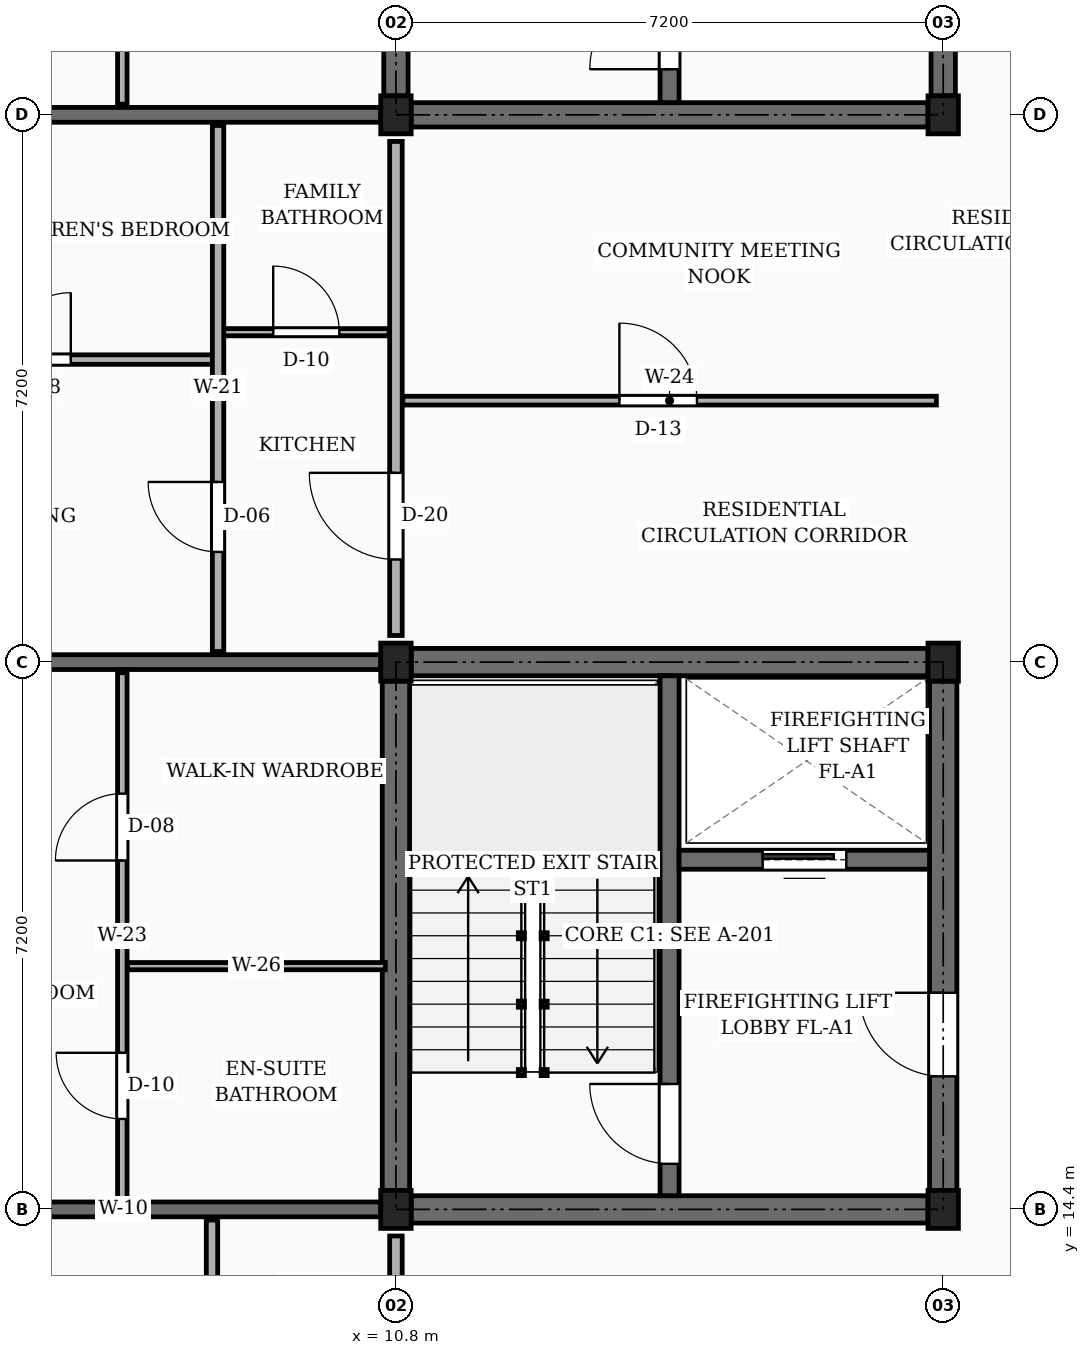
"""IFC4 building model, lengths in metres.
Left out: names, types, materials, properties, quantities, classifications, styles, units other than length and angle.
Written with IfcOpenShell. Run it as: python <this file> out.ifc"""

import sys

from ifc_helpers import new_model, si_unit, direction, frame, frame_2d, origin, origin_2d, place, context, subcontext, project, spatial, rectangle, extrude, element, fill, save


model = new_model("IFC4")
c1 = context("Model", 3, precision=1e-05, world=origin(), true_north=direction((0.0, 1.0)))
c2 = subcontext(c1, "Body", "Model", "MODEL_VIEW")
j1 = project(units=[si_unit("LENGTHUNIT", "METRE"), si_unit("PLANEANGLEUNIT", "RADIAN")], contexts=[c1])
p1 = place(None, origin())
s1 = spatial("IfcSite", under=j1, at=p1, CompositionType="ELEMENT")
p2 = place(p1, origin())
s2 = spatial("IfcBuilding", under=s1, at=p2, CompositionType="ELEMENT")
p3 = place(p2, frame((0.0, 0.0, 42.3)))
s3 = spatial("IfcBuildingStorey", under=s2, at=p3, CompositionType="ELEMENT", Elevation=42.3)
for number, where, z_axis, x_axis in (
    (1, (10.8, 14.4, 0.0), (0.0, 0.0, 1.0), (1.0, 0.0, 0.0)),
    (2, (10.8, 21.6, 0.0), (0.0, 0.0, 1.0), (1.0, 0.0, 0.0)),
    (3, (10.8, 28.8, 0.0), (0.0, 0.0, 1.0), (1.0, 0.0, 0.0)),
    (4, (18.0, 14.4, 0.0), (0.0, 0.0, 1.0), (1.0, 0.0, 0.0)),
    (5, (18.0, 21.6, 0.0), (0.0, 0.0, 1.0), (1.0, 0.0, 0.0)),
    (6, (18.0, 28.8, 0.0), (0.0, 0.0, 1.0), (1.0, 0.0, 0.0)),
):
    element("IfcColumn", number, at=place(p3, frame(where, z_axis=z_axis, x_axis=x_axis)), inside=s3, PredefinedType="COLUMN", context=c2, shape_type="SweptSolid", body=[
        extrude(rectangle(XDim=0.4, YDim=0.5, at=origin_2d()), origin(), (0.0, 0.0, 1.0), 3.15),
    ])
p4 = place(p3, frame((3.825, 14.4, 0.0), z_axis=(0.0, 0.0, 1.0), x_axis=(1.0, 0.0, 0.0)))
e7 = element("IfcWall", 7, at=p4, inside=s3, PredefinedType="SOLIDWALL", context=c2, shape_type="SweptSolid", body=[
    extrude(rectangle(XDim=6.775, YDim=0.195, at=frame_2d((3.388, 0.0))), origin(), (0.0, 0.0, 1.0), 2.17),
])
p5 = place(p4, frame((1.35, 0.0, 0.0)))
e8 = element("IfcOpeningElement", 8, at=p5, cuts=e7, PredefinedType="OPENING", context=c2, shape_type="SweptSolid", body=[
    extrude(rectangle(XDim=0.98, YDim=2.12, at=frame_2d((0.49, 1.06))), frame((0.0, 0.107, 0.0), z_axis=(0.0, -1.0, 0.0), x_axis=(1.0, 0.0, 0.0)), (0.0, 0.0, 1.0), 0.215),
])
p6 = place(p3, frame((3.825, 21.6, 0.0), z_axis=(0.0, 0.0, 1.0), x_axis=(1.0, 0.0, 0.0)))
e9 = element("IfcWall", 9, at=p6, inside=s3, PredefinedType="SOLIDWALL", context=c2, shape_type="SweptSolid", body=[
    extrude(rectangle(XDim=6.775, YDim=0.195, at=frame_2d((3.388, 0.0))), origin(), (0.0, 0.0, 1.0), 2.17),
])
p7 = place(p3, frame((3.825, 28.8, 0.0), z_axis=(0.0, 0.0, 1.0), x_axis=(1.0, 0.0, 0.0)))
e10 = element("IfcWall", 10, at=p7, inside=s3, PredefinedType="SOLIDWALL", context=c2, shape_type="SweptSolid", body=[
    extrude(rectangle(XDim=6.775, YDim=0.195, at=frame_2d((3.388, 0.0))), origin(), (0.0, 0.0, 1.0), 2.17),
])
p8 = place(p7, frame((1.35, 0.0, 0.0)))
e11 = element("IfcOpeningElement", 11, at=p8, cuts=e10, PredefinedType="OPENING", context=c2, shape_type="SweptSolid", body=[
    extrude(rectangle(XDim=0.98, YDim=2.12, at=frame_2d((0.49, 1.06))), frame((0.0, 0.107, 0.0), z_axis=(0.0, -1.0, 0.0), x_axis=(1.0, 0.0, 0.0)), (0.0, 0.0, 1.0), 0.215),
])
p9 = place(p3, frame((10.8, 14.65, 0.0), z_axis=(0.0, 0.0, 1.0), x_axis=(0.0, 1.0, 0.0)))
e12 = element("IfcWall", 12, at=p9, inside=s3, PredefinedType="SHEAR", context=c2, shape_type="SweptSolid", body=[
    extrude(rectangle(XDim=6.7, YDim=0.36, at=frame_2d((3.35, 0.0))), origin(), (0.0, 0.0, 1.0), 2.87),
])
p10 = place(p3, frame((11.0, 21.6, 0.0), z_axis=(0.0, 0.0, 1.0), x_axis=(1.0, 0.0, 0.0)))
e13 = element("IfcWall", 13, at=p10, inside=s3, PredefinedType="SHEAR", context=c2, shape_type="SweptSolid", body=[
    extrude(rectangle(XDim=6.8, YDim=0.36, at=frame_2d((3.4, 0.0))), origin(), (0.0, 0.0, 1.0), 2.87),
])
p11 = place(p3, frame((18.0, 14.65, 0.0), z_axis=(0.0, 0.0, 1.0), x_axis=(0.0, 1.0, 0.0)))
e14 = element("IfcWall", 14, at=p11, inside=s3, PredefinedType="SHEAR", context=c2, shape_type="SweptSolid", body=[
    extrude(rectangle(XDim=6.7, YDim=0.36, at=frame_2d((3.35, 0.0))), origin(), (0.0, 0.0, 1.0), 2.87),
])
p12 = place(p11, frame((1.5, 0.0, 0.0)))
e15 = element("IfcOpeningElement", 15, at=p12, cuts=e14, PredefinedType="OPENING", context=c2, shape_type="SweptSolid", body=[
    extrude(rectangle(XDim=1.1, YDim=2.15, at=frame_2d((0.55, 1.075))), frame((0.0, 0.19, 0.0), z_axis=(0.0, -1.0, 0.0), x_axis=(1.0, 0.0, 0.0)), (0.0, 0.0, 1.0), 0.38),
])
p13 = place(p3, frame((11.0, 14.4, 0.0), z_axis=(0.0, 0.0, 1.0), x_axis=(1.0, 0.0, 0.0)))
e16 = element("IfcWall", 16, at=p13, inside=s3, PredefinedType="SHEAR", context=c2, shape_type="SweptSolid", body=[
    extrude(rectangle(XDim=6.8, YDim=0.36, at=frame_2d((3.4, 0.0))), origin(), (0.0, 0.0, 1.0), 2.87),
])
p14 = place(p3, frame((14.4, 14.58, 0.0), z_axis=(0.0, 0.0, 1.0), x_axis=(0.0, 1.0, 0.0)))
e17 = element("IfcWall", 17, at=p14, inside=s3, PredefinedType="SHEAR", context=c2, shape_type="SweptSolid", body=[
    extrude(rectangle(XDim=6.84, YDim=0.25, at=frame_2d((3.42, 0.0))), origin(), (0.0, 0.0, 1.0), 2.87),
])
p15 = place(p14, frame((0.42, 0.0, 0.0)))
e18 = element("IfcOpeningElement", 18, at=p15, cuts=e17, PredefinedType="OPENING", context=c2, shape_type="SweptSolid", body=[
    extrude(rectangle(XDim=1.05, YDim=2.15, at=frame_2d((0.525, 1.075))), frame((0.0, 0.135, 0.0), z_axis=(0.0, -1.0, 0.0), x_axis=(1.0, 0.0, 0.0)), (0.0, 0.0, 1.0), 0.27),
])
p16 = place(p3, frame((14.525, 19.0, 0.0), z_axis=(0.0, 0.0, 1.0), x_axis=(1.0, 0.0, 0.0)))
e19 = element("IfcWall", 19, at=p16, inside=s3, PredefinedType="SHEAR", context=c2, shape_type="SweptSolid", body=[
    extrude(rectangle(XDim=3.295, YDim=0.25, at=frame_2d((1.647, 0.0))), origin(), (0.0, 0.0, 1.0), 2.87),
])
p17 = place(p16, frame((1.1, 0.0, 0.0)))
e20 = element("IfcOpeningElement", 20, at=p17, cuts=e19, PredefinedType="OPENING", context=c2, shape_type="SweptSolid", body=[
    extrude(rectangle(XDim=1.1, YDim=2.2, at=frame_2d((0.55, 1.1))), frame((0.0, 0.135, 0.0), z_axis=(0.0, -1.0, 0.0), x_axis=(1.0, 0.0, 0.0)), (0.0, 0.0, 1.0), 0.27),
])
p18 = place(p3, frame((10.8, 29.05, 0.0), z_axis=(0.0, 0.0, 1.0), x_axis=(0.0, 1.0, 0.0)))
e21 = element("IfcWall", 21, at=p18, inside=s3, PredefinedType="SHEAR", context=c2, shape_type="SweptSolid", body=[
    extrude(rectangle(XDim=6.7, YDim=0.32, at=frame_2d((3.35, 0.0))), origin(), (0.0, 0.0, 1.0), 2.87),
])
p19 = place(p3, frame((18.0, 29.05, 0.0), z_axis=(0.0, 0.0, 1.0), x_axis=(0.0, 1.0, 0.0)))
e22 = element("IfcWall", 22, at=p19, inside=s3, PredefinedType="SHEAR", context=c2, shape_type="SweptSolid", body=[
    extrude(rectangle(XDim=6.7, YDim=0.32, at=frame_2d((3.35, 0.0))), origin(), (0.0, 0.0, 1.0), 2.87),
])
p20 = place(p19, frame((1.5, 0.0, 0.0)))
e23 = element("IfcOpeningElement", 23, at=p20, cuts=e22, PredefinedType="OPENING", context=c2, shape_type="SweptSolid", body=[
    extrude(rectangle(XDim=1.1, YDim=2.15, at=frame_2d((0.55, 1.075))), frame((0.0, 0.17, 0.0), z_axis=(0.0, -1.0, 0.0), x_axis=(1.0, 0.0, 0.0)), (0.0, 0.0, 1.0), 0.34),
])
p21 = place(p3, frame((11.0, 28.8, 0.0), z_axis=(0.0, 0.0, 1.0), x_axis=(1.0, 0.0, 0.0)))
e24 = element("IfcWall", 24, at=p21, inside=s3, PredefinedType="SHEAR", context=c2, shape_type="SweptSolid", body=[
    extrude(rectangle(XDim=6.8, YDim=0.32, at=frame_2d((3.4, 0.0))), origin(), (0.0, 0.0, 1.0), 2.87),
])
p22 = place(p3, frame((14.4, 28.96, 0.0), z_axis=(0.0, 0.0, 1.0), x_axis=(0.0, 1.0, 0.0)))
e25 = element("IfcWall", 25, at=p22, inside=s3, PredefinedType="SHEAR", context=c2, shape_type="SweptSolid", body=[
    extrude(rectangle(XDim=6.88, YDim=0.25, at=frame_2d((3.44, 0.0))), origin(), (0.0, 0.0, 1.0), 2.87),
])
p23 = place(p22, frame((0.44, 0.0, 0.0)))
e26 = element("IfcOpeningElement", 26, at=p23, cuts=e25, PredefinedType="OPENING", context=c2, shape_type="SweptSolid", body=[
    extrude(rectangle(XDim=1.05, YDim=2.15, at=frame_2d((0.525, 1.075))), frame((0.0, 0.135, 0.0), z_axis=(0.0, -1.0, 0.0), x_axis=(1.0, 0.0, 0.0)), (0.0, 0.0, 1.0), 0.27),
])
p24 = place(p3, frame((10.8, 7.55, 0.0), z_axis=(0.0, 0.0, 1.0), x_axis=(0.0, 1.0, 0.0)))
e27 = element("IfcWall", 27, at=p24, inside=s3, PredefinedType="PARTITIONING", context=c2, shape_type="SweptSolid", body=[
    extrude(rectangle(XDim=6.5, YDim=0.165, at=frame_2d((3.25, 0.0))), origin(), (0.0, 0.0, 1.0), 2.305),
])
p25 = place(p24, frame((1.0, 0.0, 0.0)))
e28 = element("IfcOpeningElement", 28, at=p25, cuts=e27, PredefinedType="OPENING", context=c2, shape_type="SweptSolid", body=[
    extrude(rectangle(XDim=0.94, YDim=2.12, at=frame_2d((0.47, 1.06))), frame((0.0, 0.093, 0.0), z_axis=(0.0, -1.0, 0.0), x_axis=(1.0, 0.0, 0.0)), (0.0, 0.0, 1.0), 0.185),
])
p26 = place(p3, frame((10.8, 21.95, 0.0), z_axis=(0.0, 0.0, 1.0), x_axis=(0.0, 1.0, 0.0)))
e29 = element("IfcWall", 29, at=p26, inside=s3, PredefinedType="PARTITIONING", context=c2, shape_type="SweptSolid", body=[
    extrude(rectangle(XDim=6.5, YDim=0.165, at=frame_2d((3.25, 0.0))), origin(), (0.0, 0.0, 1.0), 2.305),
])
p27 = place(p26, frame((1.0, 0.0, 0.0)))
e30 = element("IfcOpeningElement", 30, at=p27, cuts=e29, PredefinedType="OPENING", context=c2, shape_type="SweptSolid", body=[
    extrude(rectangle(XDim=1.14, YDim=2.18, at=frame_2d((0.57, 1.09))), frame((0.0, 0.093, 0.0), z_axis=(0.0, -1.0, 0.0), x_axis=(1.0, 0.0, 0.0)), (0.0, 0.0, 1.0), 0.185),
])
p28 = place(p3, frame((8.38, 7.375, 0.0), z_axis=(0.0, 0.0, 1.0), x_axis=(0.0, 1.0, 0.0)))
e31 = element("IfcWall", 31, at=p28, inside=s3, PredefinedType="PARTITIONING", context=c2, shape_type="SweptSolid", body=[
    extrude(rectangle(XDim=6.885, YDim=0.15, at=frame_2d((3.442, 0.0))), origin(), (0.0, 0.0, 1.0), 2.305),
])
p29 = place(p28, frame((1.275, 0.0, 0.0)))
e32 = element("IfcOpeningElement", 32, at=p29, cuts=e31, PredefinedType="OPENING", context=c2, shape_type="SweptSolid", body=[
    extrude(rectangle(XDim=0.92, YDim=2.1, at=frame_2d((0.46, 1.05))), frame((0.0, 0.085, 0.0), z_axis=(0.0, -1.0, 0.0), x_axis=(1.0, 0.0, 0.0)), (0.0, 0.0, 1.0), 0.17),
])
p30 = place(p3, frame((7.2, 14.54, 0.0), z_axis=(0.0, 0.0, 1.0), x_axis=(0.0, 1.0, 0.0)))
e33 = element("IfcWall", 33, at=p30, inside=s3, PredefinedType="PARTITIONING", context=c2, shape_type="SweptSolid", body=[
    extrude(rectangle(XDim=6.92, YDim=0.125, at=frame_2d((3.46, 0.0))), origin(), (0.0, 0.0, 1.0), 2.305),
])
p31 = place(p30, frame((1.05, 0.0, 0.0)))
e34 = element("IfcOpeningElement", 34, at=p31, cuts=e33, PredefinedType="OPENING", context=c2, shape_type="SweptSolid", body=[
    extrude(rectangle(XDim=0.87, YDim=2.05, at=frame_2d((0.435, 1.025))), frame((0.0, 0.073, 0.0), z_axis=(0.0, -1.0, 0.0), x_axis=(1.0, 0.0, 0.0)), (0.0, 0.0, 1.0), 0.145),
])
p32 = place(p30, frame((4.45, 0.0, 0.0)))
e35 = element("IfcOpeningElement", 35, at=p32, cuts=e33, PredefinedType="OPENING", context=c2, shape_type="SweptSolid", body=[
    extrude(rectangle(XDim=0.88, YDim=2.08, at=frame_2d((0.44, 1.04))), frame((0.0, 0.073, 0.0), z_axis=(0.0, -1.0, 0.0), x_axis=(1.0, 0.0, 0.0)), (0.0, 0.0, 1.0), 0.145),
])
p33 = place(p3, frame((7.27, 17.6, 0.0), z_axis=(0.0, 0.0, 1.0), x_axis=(1.0, 0.0, 0.0)))
e36 = element("IfcWall", 36, at=p33, inside=s3, PredefinedType="PARTITIONING", context=c2, shape_type="SweptSolid", body=[
    extrude(rectangle(XDim=3.39, YDim=0.095, at=frame_2d((1.695, 0.0))), origin(), (0.0, 0.0, 1.0), 2.305),
])
p34 = place(p3, frame((10.89, 25.04, 0.0), z_axis=(0.0, 0.0, 1.0), x_axis=(1.0, 0.0, 0.0)))
e37 = element("IfcWall", 37, at=p34, inside=s3, PredefinedType="PARTITIONING", context=c2, shape_type="SweptSolid", body=[
    extrude(rectangle(XDim=7.02, YDim=0.115, at=frame_2d((3.51, 0.0))), origin(), (0.0, 0.0, 1.0), 2.305),
])
p35 = place(p34, frame((2.85, 0.0, 0.0)))
e38 = element("IfcOpeningElement", 38, at=p35, cuts=e37, PredefinedType="OPENING", context=c2, shape_type="SweptSolid", body=[
    extrude(rectangle(XDim=1.02, YDim=2.15, at=frame_2d((0.51, 1.075))), frame((0.0, 0.067, 0.0), z_axis=(0.0, -1.0, 0.0), x_axis=(1.0, 0.0, 0.0)), (0.0, 0.0, 1.0), 0.135),
])
p36 = place(p3, frame((3.775, 25.58, 0.0), z_axis=(0.0, 0.0, 1.0), x_axis=(1.0, 0.0, 0.0)))
e39 = element("IfcWall", 39, at=p36, inside=s3, PredefinedType="PARTITIONING", context=c2, shape_type="SweptSolid", body=[
    extrude(rectangle(XDim=4.615, YDim=0.125, at=frame_2d((2.308, 0.0))), origin(), (0.0, 0.0, 1.0), 2.305),
])
p37 = place(p36, frame((1.867, 0.0, 0.0)))
e40 = element("IfcOpeningElement", 40, at=p37, cuts=e39, PredefinedType="OPENING", context=c2, shape_type="SweptSolid", body=[
    extrude(rectangle(XDim=0.88, YDim=2.08, at=frame_2d((0.44, 1.04))), frame((0.0, 0.073, 0.0), z_axis=(0.0, -1.0, 0.0), x_axis=(1.0, 0.0, 0.0)), (0.0, 0.0, 1.0), 0.145),
])
p38 = place(p3, frame((8.53, 25.94, 0.0), z_axis=(0.0, 0.0, 1.0), x_axis=(1.0, 0.0, 0.0)))
e41 = element("IfcWall", 41, at=p38, inside=s3, PredefinedType="PARTITIONING", context=c2, shape_type="SweptSolid", body=[
    extrude(rectangle(XDim=2.18, YDim=0.095, at=frame_2d((1.09, 0.0))), origin(), (0.0, 0.0, 1.0), 2.305),
])
p39 = place(p38, frame((0.655, 0.0, 0.0)))
e42 = element("IfcOpeningElement", 42, at=p39, cuts=e41, PredefinedType="OPENING", context=c2, shape_type="SweptSolid", body=[
    extrude(rectangle(XDim=0.87, YDim=2.05, at=frame_2d((0.435, 1.025))), frame((0.0, 0.058, 0.0), z_axis=(0.0, -1.0, 0.0), x_axis=(1.0, 0.0, 0.0)), (0.0, 0.0, 1.0), 0.115),
])
p40 = place(p3, frame((8.46, 21.74, 0.0), z_axis=(0.0, 0.0, 1.0), x_axis=(0.0, 1.0, 0.0)))
e43 = element("IfcWall", 43, at=p40, inside=s3, PredefinedType="PARTITIONING", context=c2, shape_type="SweptSolid", body=[
    extrude(rectangle(XDim=6.92, YDim=0.15, at=frame_2d((3.46, 0.0))), origin(), (0.0, 0.0, 1.0), 2.305),
])
p41 = place(p40, frame((1.31, 0.0, 0.0)))
e44 = element("IfcOpeningElement", 44, at=p41, cuts=e43, PredefinedType="OPENING", context=c2, shape_type="SweptSolid", body=[
    extrude(rectangle(XDim=0.92, YDim=2.1, at=frame_2d((0.46, 1.05))), frame((0.0, 0.085, 0.0), z_axis=(0.0, -1.0, 0.0), x_axis=(1.0, 0.0, 0.0)), (0.0, 0.0, 1.0), 0.17),
])
p42 = place(p3, frame((7.2, 28.94, 0.0), z_axis=(0.0, 0.0, 1.0), x_axis=(0.0, 1.0, 0.0)))
e45 = element("IfcWall", 45, at=p42, inside=s3, PredefinedType="PARTITIONING", context=c2, shape_type="SweptSolid", body=[
    extrude(rectangle(XDim=6.92, YDim=0.125, at=frame_2d((3.46, 0.0))), origin(), (0.0, 0.0, 1.0), 2.305),
])
p43 = place(p42, frame((1.05, 0.0, 0.0)))
e46 = element("IfcOpeningElement", 46, at=p43, cuts=e45, PredefinedType="OPENING", context=c2, shape_type="SweptSolid", body=[
    extrude(rectangle(XDim=0.87, YDim=2.05, at=frame_2d((0.435, 1.025))), frame((0.0, 0.073, 0.0), z_axis=(0.0, -1.0, 0.0), x_axis=(1.0, 0.0, 0.0)), (0.0, 0.0, 1.0), 0.145),
])
p44 = place(p42, frame((4.45, 0.0, 0.0)))
e47 = element("IfcOpeningElement", 47, at=p44, cuts=e45, PredefinedType="OPENING", context=c2, shape_type="SweptSolid", body=[
    extrude(rectangle(XDim=0.88, YDim=2.08, at=frame_2d((0.44, 1.04))), frame((0.0, 0.073, 0.0), z_axis=(0.0, -1.0, 0.0), x_axis=(1.0, 0.0, 0.0)), (0.0, 0.0, 1.0), 0.145),
])
p45 = place(p12, frame((1.1, 0.0, 0.0), z_axis=(0.0, 0.0, 1.0), x_axis=(-1.0, 0.0, 0.0)))
e48 = element("IfcDoor", 48, at=p45, inside=s3, OperationType="SINGLE_SWING_RIGHT", PredefinedType="DOOR", context=c2, shape_type="SweptSolid", body=[
    extrude(rectangle(XDim=1.1, YDim=2.15, at=frame_2d((0.55, 1.075))), frame((0.0, 0.025, 0.0), z_axis=(0.0, -1.0, 0.0), x_axis=(1.0, 0.0, 0.0)), (0.0, 0.0, 1.0), 0.05),
])
fill(e15, e48)
p46 = place(p15, origin())
e49 = element("IfcDoor", 49, at=p46, inside=s3, OperationType="SINGLE_SWING_RIGHT", PredefinedType="DOOR", context=c2, shape_type="SweptSolid", body=[
    extrude(rectangle(XDim=1.05, YDim=2.15, at=frame_2d((0.525, 1.075))), frame((0.0, 0.025, 0.0), z_axis=(0.0, -1.0, 0.0), x_axis=(1.0, 0.0, 0.0)), (0.0, 0.0, 1.0), 0.05),
])
fill(e18, e49)
p47 = place(p17, origin())
e50 = element("IfcDoor", 50, at=p47, inside=s3, OperationType="SLIDING_TO_LEFT", PredefinedType="DOOR", context=c2, shape_type="SweptSolid", body=[
    extrude(rectangle(XDim=1.1, YDim=2.2, at=frame_2d((0.55, 1.1))), frame((0.0, 0.025, 0.0), z_axis=(0.0, -1.0, 0.0), x_axis=(1.0, 0.0, 0.0)), (0.0, 0.0, 1.0), 0.05),
])
fill(e20, e50)
p48 = place(p23, origin())
e51 = element("IfcDoor", 51, at=p48, inside=s3, OperationType="SINGLE_SWING_LEFT", PredefinedType="DOOR", context=c2, shape_type="SweptSolid", body=[
    extrude(rectangle(XDim=1.05, YDim=2.15, at=frame_2d((0.525, 1.075))), frame((0.0, 0.025, 0.0), z_axis=(0.0, -1.0, 0.0), x_axis=(1.0, 0.0, 0.0)), (0.0, 0.0, 1.0), 0.05),
])
fill(e26, e51)
p49 = place(p27, origin())
e52 = element("IfcDoor", 52, at=p49, inside=s3, OperationType="SINGLE_SWING_RIGHT", PredefinedType="DOOR", context=c2, shape_type="SweptSolid", body=[
    extrude(rectangle(XDim=1.14, YDim=2.18, at=frame_2d((0.57, 1.09))), frame((0.0, 0.025, 0.0), z_axis=(0.0, -1.0, 0.0), x_axis=(1.0, 0.0, 0.0)), (0.0, 0.0, 1.0), 0.05),
])
fill(e30, e52)
p50 = place(p31, origin())
e53 = element("IfcDoor", 53, at=p50, inside=s3, OperationType="SINGLE_SWING_RIGHT", PredefinedType="DOOR", context=c2, shape_type="SweptSolid", body=[
    extrude(rectangle(XDim=0.87, YDim=2.05, at=frame_2d((0.435, 1.025))), frame((0.0, 0.025, 0.0), z_axis=(0.0, -1.0, 0.0), x_axis=(1.0, 0.0, 0.0)), (0.0, 0.0, 1.0), 0.05),
])
fill(e34, e53)
p51 = place(p32, origin())
e54 = element("IfcDoor", 54, at=p51, inside=s3, OperationType="SINGLE_SWING_LEFT", PredefinedType="DOOR", context=c2, shape_type="SweptSolid", body=[
    extrude(rectangle(XDim=0.88, YDim=2.08, at=frame_2d((0.44, 1.04))), frame((0.0, 0.025, 0.0), z_axis=(0.0, -1.0, 0.0), x_axis=(1.0, 0.0, 0.0)), (0.0, 0.0, 1.0), 0.05),
])
fill(e35, e54)
p52 = place(p35, origin())
e55 = element("IfcDoor", 55, at=p52, inside=s3, OperationType="SINGLE_SWING_LEFT", PredefinedType="DOOR", context=c2, shape_type="SweptSolid", body=[
    extrude(rectangle(XDim=1.02, YDim=2.15, at=frame_2d((0.51, 1.075))), frame((0.0, 0.025, 0.0), z_axis=(0.0, -1.0, 0.0), x_axis=(1.0, 0.0, 0.0)), (0.0, 0.0, 1.0), 0.05),
])
fill(e38, e55)
p53 = place(p37, origin())
e56 = element("IfcDoor", 56, at=p53, inside=s3, OperationType="SINGLE_SWING_RIGHT", PredefinedType="DOOR", context=c2, shape_type="SweptSolid", body=[
    extrude(rectangle(XDim=0.88, YDim=2.08, at=frame_2d((0.44, 1.04))), frame((0.0, 0.025, 0.0), z_axis=(0.0, -1.0, 0.0), x_axis=(1.0, 0.0, 0.0)), (0.0, 0.0, 1.0), 0.05),
])
fill(e40, e56)
p54 = place(p39, origin())
e57 = element("IfcDoor", 57, at=p54, inside=s3, OperationType="SINGLE_SWING_LEFT", PredefinedType="DOOR", context=c2, shape_type="SweptSolid", body=[
    extrude(rectangle(XDim=0.87, YDim=2.05, at=frame_2d((0.435, 1.025))), frame((0.0, 0.025, 0.0), z_axis=(0.0, -1.0, 0.0), x_axis=(1.0, 0.0, 0.0)), (0.0, 0.0, 1.0), 0.05),
])
fill(e42, e57)
p55 = place(p41, origin())
e58 = element("IfcDoor", 58, at=p55, inside=s3, OperationType="SINGLE_SWING_RIGHT", PredefinedType="DOOR", context=c2, shape_type="SweptSolid", body=[
    extrude(rectangle(XDim=0.92, YDim=2.1, at=frame_2d((0.46, 1.05))), frame((0.0, 0.025, 0.0), z_axis=(0.0, -1.0, 0.0), x_axis=(1.0, 0.0, 0.0)), (0.0, 0.0, 1.0), 0.05),
])
fill(e44, e58)
save(model, sys.argv[1])
